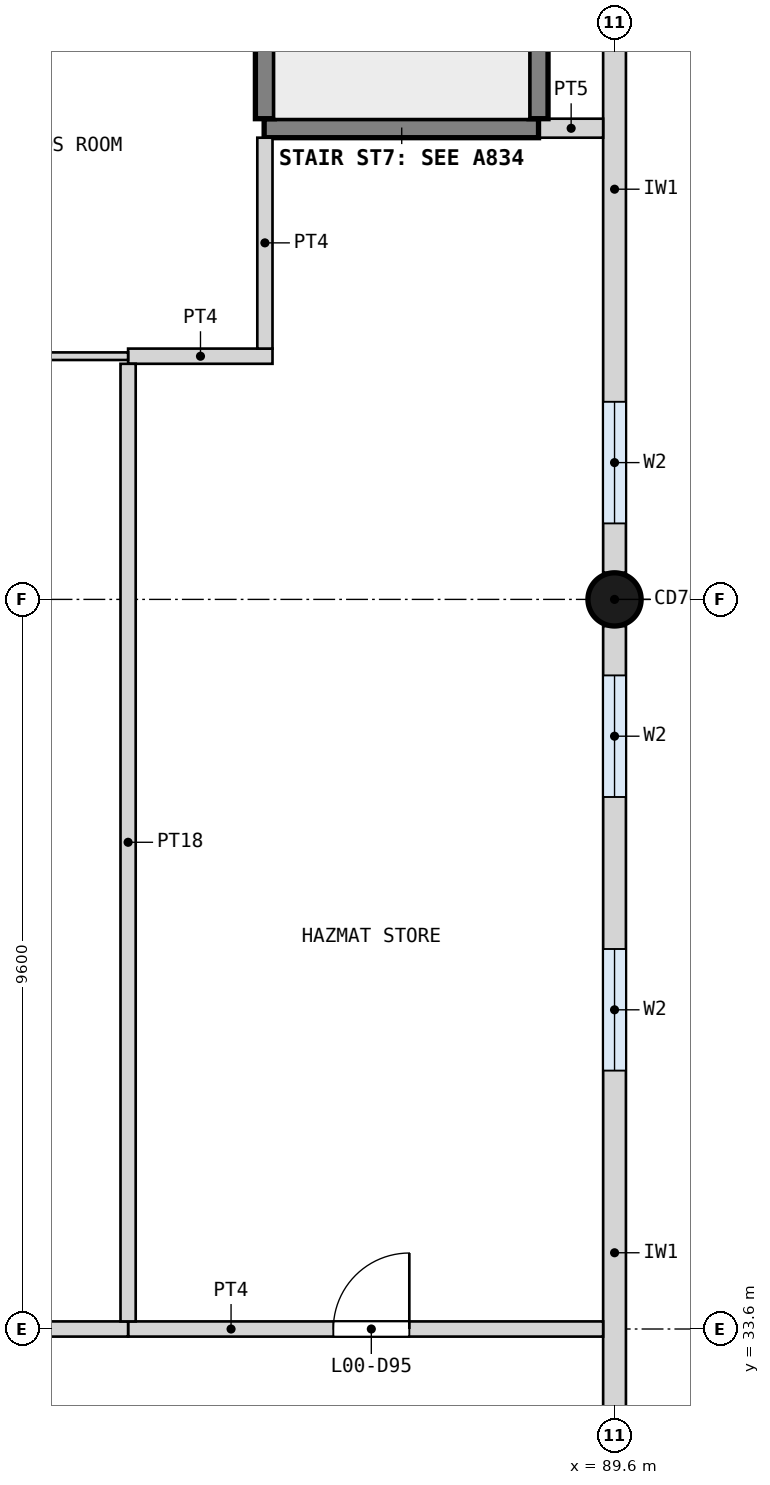
"""IFC4 building model, lengths in metres.
Left out: names, types, materials, properties, quantities, classifications, styles, units other than length and angle.
Written with IfcOpenShell. Run it as: python <this file> out.ifc"""

import sys

from ifc_helpers import new_model, si_unit, direction, frame, frame_2d, origin, origin_2d, place, context, subcontext, project, spatial, rectangle, circle, extrude, element, fill, save


model = new_model("IFC4")
c1 = context("Model", 3, precision=1e-05, world=origin(), true_north=direction((0.0, 1.0)))
c2 = subcontext(c1, "Body", "Model", "MODEL_VIEW")
j1 = project(units=[si_unit("LENGTHUNIT", "METRE"), si_unit("PLANEANGLEUNIT", "RADIAN")], contexts=[c1])
p1 = place(None, origin())
s1 = spatial("IfcSite", under=j1, at=p1, CompositionType="ELEMENT")
p2 = place(p1, origin())
s2 = spatial("IfcBuilding", under=s1, at=p2, CompositionType="ELEMENT")
p3 = place(p2, origin())
s3 = spatial("IfcBuildingStorey", under=s2, at=p3, CompositionType="ELEMENT", Elevation=0.0)
p4 = place(p3, frame((89.6, 43.2, 0.0), z_axis=(0.0, 0.0, 1.0), x_axis=(1.0, 0.0, 0.0)))
e1 = element("IfcColumn", 1, at=p4, inside=s3, PredefinedType="COLUMN", context=c2, shape_type="SweptSolid", body=[
    extrude(circle(Radius=0.35, at=origin_2d()), origin(), (0.0, 0.0, 1.0), 4.2),
])
p5 = place(p3, frame((89.6, 29.15, 0.0), z_axis=(0.0, 0.0, 1.0), x_axis=(0.0, 1.0, 0.0)))
e2 = element("IfcWall", 2, at=p5, inside=s3, PredefinedType="SOLIDWALL", context=c2, shape_type="SweptSolid", body=[
    extrude(rectangle(XDim=13.7, YDim=0.3, at=frame_2d((6.85, 0.0))), origin(), (0.0, 0.0, 1.0), 3.0),
])
p6 = place(p5, frame((1.05, 0.0, 0.0)))
e3 = element("IfcOpeningElement", 3, at=p6, cuts=e2, PredefinedType="OPENING", context=c2, shape_type="SweptSolid", body=[
    extrude(rectangle(XDim=2.0, YDim=2.1, at=frame_2d((1.0, 1.05))), frame((0.0, 0.16, 0.0), z_axis=(0.0, -1.0, 0.0), x_axis=(1.0, 0.0, 0.0)), (0.0, 0.0, 1.0), 0.32),
])
p7 = place(p5, frame((7.85, 0.0, 0.3)))
e4 = element("IfcOpeningElement", 4, at=p7, cuts=e2, PredefinedType="OPENING", context=c2, shape_type="SweptSolid", body=[
    extrude(rectangle(XDim=1.6, YDim=2.4, at=frame_2d((0.8, 1.2))), frame((0.0, 0.16, 0.0), z_axis=(0.0, -1.0, 0.0), x_axis=(1.0, 0.0, 0.0)), (0.0, 0.0, 1.0), 0.32),
])
p8 = place(p5, frame((11.45, 0.0, 0.3)))
e5 = element("IfcOpeningElement", 5, at=p8, cuts=e2, PredefinedType="OPENING", context=c2, shape_type="SweptSolid", body=[
    extrude(rectangle(XDim=1.6, YDim=2.4, at=frame_2d((0.8, 1.2))), frame((0.0, 0.16, 0.0), z_axis=(0.0, -1.0, 0.0), x_axis=(1.0, 0.0, 0.0)), (0.0, 0.0, 1.0), 0.32),
])
p9 = place(p3, frame((89.6, 43.55, 0.0), z_axis=(0.0, 0.0, 1.0), x_axis=(0.0, 1.0, 0.0)))
e6 = element("IfcWall", 6, at=p9, inside=s3, PredefinedType="SOLIDWALL", context=c2, shape_type="SweptSolid", body=[
    extrude(rectangle(XDim=13.7, YDim=0.3, at=frame_2d((6.85, 0.0))), origin(), (0.0, 0.0, 1.0), 3.0),
])
p10 = place(p9, frame((0.65, 0.0, 0.3)))
e7 = element("IfcOpeningElement", 7, at=p10, cuts=e6, PredefinedType="OPENING", context=c2, shape_type="SweptSolid", body=[
    extrude(rectangle(XDim=1.6, YDim=2.4, at=frame_2d((0.8, 1.2))), frame((0.0, 0.16, 0.0), z_axis=(0.0, -1.0, 0.0), x_axis=(1.0, 0.0, 0.0)), (0.0, 0.0, 1.0), 0.32),
])
p11 = place(p9, frame((7.85, 0.0, 0.3)))
e8 = element("IfcOpeningElement", 8, at=p11, cuts=e6, PredefinedType="OPENING", context=c2, shape_type="SweptSolid", body=[
    extrude(rectangle(XDim=1.6, YDim=2.4, at=frame_2d((0.8, 1.2))), frame((0.0, 0.16, 0.0), z_axis=(0.0, -1.0, 0.0), x_axis=(1.0, 0.0, 0.0)), (0.0, 0.0, 1.0), 0.32),
])
p12 = place(p9, frame((11.45, 0.0, 0.3)))
e9 = element("IfcOpeningElement", 9, at=p12, cuts=e6, PredefinedType="OPENING", context=c2, shape_type="SweptSolid", body=[
    extrude(rectangle(XDim=1.6, YDim=2.4, at=frame_2d((0.8, 1.2))), frame((0.0, 0.16, 0.0), z_axis=(0.0, -1.0, 0.0), x_axis=(1.0, 0.0, 0.0)), (0.0, 0.0, 1.0), 0.32),
])
p13 = place(p3, frame((89.45, 33.6, 0.0), z_axis=(0.0, 0.0, 1.0), x_axis=(-1.0, 0.0, 0.0)))
e10 = element("IfcWall", 10, at=p13, inside=s3, PredefinedType="PARTITIONING", context=c2, shape_type="SweptSolid", body=[
    extrude(rectangle(XDim=6.25, YDim=0.2, at=frame_2d((3.125, 0.0))), origin(), (0.0, 0.0, 1.0), 3.9),
])
p14 = place(p13, frame((2.55, 0.0, 0.0)))
e11 = element("IfcOpeningElement", 11, at=p14, cuts=e10, PredefinedType="OPENING", context=c2, shape_type="SweptSolid", body=[
    extrude(rectangle(XDim=1.0, YDim=2.1, at=frame_2d((0.5, 1.05))), frame((0.0, 0.11, 0.0), z_axis=(0.0, -1.0, 0.0), x_axis=(1.0, 0.0, 0.0)), (0.0, 0.0, 1.0), 0.22),
])
p15 = place(p3, frame((83.2, 33.6, 0.0), z_axis=(0.0, 0.0, 1.0), x_axis=(-1.0, 0.0, 0.0)))
e12 = element("IfcWall", 12, at=p15, inside=s3, PredefinedType="PARTITIONING", context=c2, shape_type="SweptSolid", body=[
    extrude(rectangle(XDim=6.4, YDim=0.2, at=frame_2d((3.2, 0.0))), origin(), (0.0, 0.0, 1.0), 3.9),
])
p16 = place(p15, frame((2.65, 0.0, 0.0)))
e13 = element("IfcOpeningElement", 13, at=p16, cuts=e12, PredefinedType="OPENING", context=c2, shape_type="SweptSolid", body=[
    extrude(rectangle(XDim=1.1, YDim=2.1, at=frame_2d((0.55, 1.05))), frame((0.0, 0.11, 0.0), z_axis=(0.0, -1.0, 0.0), x_axis=(1.0, 0.0, 0.0)), (0.0, 0.0, 1.0), 0.22),
])
p17 = place(p3, frame((85.1, 46.4, 0.0), z_axis=(0.0, 0.0, 1.0), x_axis=(-1.0, 0.0, 0.0)))
e14 = element("IfcWall", 14, at=p17, inside=s3, PredefinedType="PARTITIONING", context=c2, shape_type="SweptSolid", body=[
    extrude(rectangle(XDim=1.9, YDim=0.2, at=frame_2d((0.95, 0.0))), origin(), (0.0, 0.0, 1.0), 3.9),
])
p18 = place(p3, frame((83.2, 46.4, 0.0), z_axis=(0.0, 0.0, 1.0), x_axis=(-1.0, 0.0, 0.0)))
e15 = element("IfcWall", 15, at=p18, inside=s3, PredefinedType="PARTITIONING", context=c2, shape_type="SweptSolid", body=[
    extrude(rectangle(XDim=6.4, YDim=0.1, at=frame_2d((3.2, 0.0))), origin(), (0.0, 0.0, 1.0), 3.9),
])
p19 = place(p3, frame((89.45, 49.4, 0.0), z_axis=(0.0, 0.0, 1.0), x_axis=(-1.0, 0.0, 0.0)))
e16 = element("IfcWall", 16, at=p19, inside=s3, PredefinedType="PARTITIONING", context=c2, shape_type="SweptSolid", body=[
    extrude(rectangle(XDim=0.85, YDim=0.25, at=frame_2d((0.425, 0.0))), origin(), (0.0, 0.0, 1.0), 3.9),
])
p20 = place(p3, frame((88.6, 49.4, 0.0), z_axis=(0.0, 0.0, 1.0), x_axis=(-1.0, 0.0, 0.0)))
e17 = element("IfcWall", 17, at=p20, inside=s3, PredefinedType="SHEAR", context=c2, shape_type="SweptSolid", body=[
    extrude(rectangle(XDim=3.61, YDim=0.25, at=frame_2d((1.805, 0.0))), origin(), (0.0, 0.0, 1.0), 3.9),
])
p21 = place(p3, frame((88.6, 49.525, 0.0), z_axis=(0.0, 0.0, 1.0), x_axis=(0.0, 1.0, 0.0)))
e18 = element("IfcWall", 18, at=p21, inside=s3, PredefinedType="SHEAR", context=c2, shape_type="SweptSolid", body=[
    extrude(rectangle(XDim=5.75, YDim=0.25, at=frame_2d((2.875, 0.0))), origin(), (0.0, 0.0, 1.0), 3.9),
])
p22 = place(p3, frame((85.0, 46.5, 0.0), z_axis=(0.0, 0.0, 1.0), x_axis=(0.0, 1.0, 0.0)))
e19 = element("IfcWall", 19, at=p22, inside=s3, PredefinedType="PARTITIONING", context=c2, shape_type="SweptSolid", body=[
    extrude(rectangle(XDim=2.775, YDim=0.2, at=frame_2d((1.387, 0.0))), origin(), (0.0, 0.0, 1.0), 3.9),
])
p23 = place(p3, frame((85.0, 49.525, 0.0), z_axis=(0.0, 0.0, 1.0), x_axis=(0.0, 1.0, 0.0)))
e20 = element("IfcWall", 20, at=p23, inside=s3, PredefinedType="SHEAR", context=c2, shape_type="SweptSolid", body=[
    extrude(rectangle(XDim=3.175, YDim=0.25, at=frame_2d((1.587, 0.0))), origin(), (0.0, 0.0, 1.0), 3.9),
])
p24 = place(p3, frame((83.2, 33.7, 0.0), z_axis=(0.0, 0.0, 1.0), x_axis=(0.0, 1.0, 0.0)))
e21 = element("IfcWall", 21, at=p24, inside=s3, PredefinedType="PARTITIONING", context=c2, shape_type="SweptSolid", body=[
    extrude(rectangle(XDim=12.6, YDim=0.2, at=frame_2d((6.3, 0.0))), origin(), (0.0, 0.0, 1.0), 3.0),
])
p25 = place(p14, frame((1.0, 0.0, 0.0), z_axis=(0.0, 0.0, 1.0), x_axis=(-1.0, 0.0, 0.0)))
e22 = element("IfcDoor", 22, at=p25, inside=s3, OperationType="SINGLE_SWING_RIGHT", PredefinedType="DOOR", context=c2, shape_type="SweptSolid", body=[
    extrude(rectangle(XDim=1.0, YDim=2.1, at=frame_2d((0.5, 1.05))), frame((0.0, 0.025, 0.0), z_axis=(0.0, -1.0, 0.0), x_axis=(1.0, 0.0, 0.0)), (0.0, 0.0, 1.0), 0.05),
])
fill(e11, e22)
p26 = place(p7, origin())
e23 = element("IfcWindow", 23, at=p26, inside=s3, PartitioningType="SINGLE_PANEL", PredefinedType="WINDOW", context=c2, shape_type="SweptSolid", body=[
    extrude(rectangle(XDim=1.6, YDim=2.4, at=frame_2d((0.8, 1.2))), frame((0.0, 0.03, 0.0), z_axis=(0.0, -1.0, 0.0), x_axis=(1.0, 0.0, 0.0)), (0.0, 0.0, 1.0), 0.06),
])
fill(e4, e23)
p27 = place(p8, origin())
e24 = element("IfcWindow", 24, at=p27, inside=s3, PartitioningType="SINGLE_PANEL", PredefinedType="WINDOW", context=c2, shape_type="SweptSolid", body=[
    extrude(rectangle(XDim=1.6, YDim=2.4, at=frame_2d((0.8, 1.2))), frame((0.0, 0.03, 0.0), z_axis=(0.0, -1.0, 0.0), x_axis=(1.0, 0.0, 0.0)), (0.0, 0.0, 1.0), 0.06),
])
fill(e5, e24)
p28 = place(p10, origin())
e25 = element("IfcWindow", 25, at=p28, inside=s3, PartitioningType="SINGLE_PANEL", PredefinedType="WINDOW", context=c2, shape_type="SweptSolid", body=[
    extrude(rectangle(XDim=1.6, YDim=2.4, at=frame_2d((0.8, 1.2))), frame((0.0, 0.03, 0.0), z_axis=(0.0, -1.0, 0.0), x_axis=(1.0, 0.0, 0.0)), (0.0, 0.0, 1.0), 0.06),
])
fill(e7, e25)
save(model, sys.argv[1])
